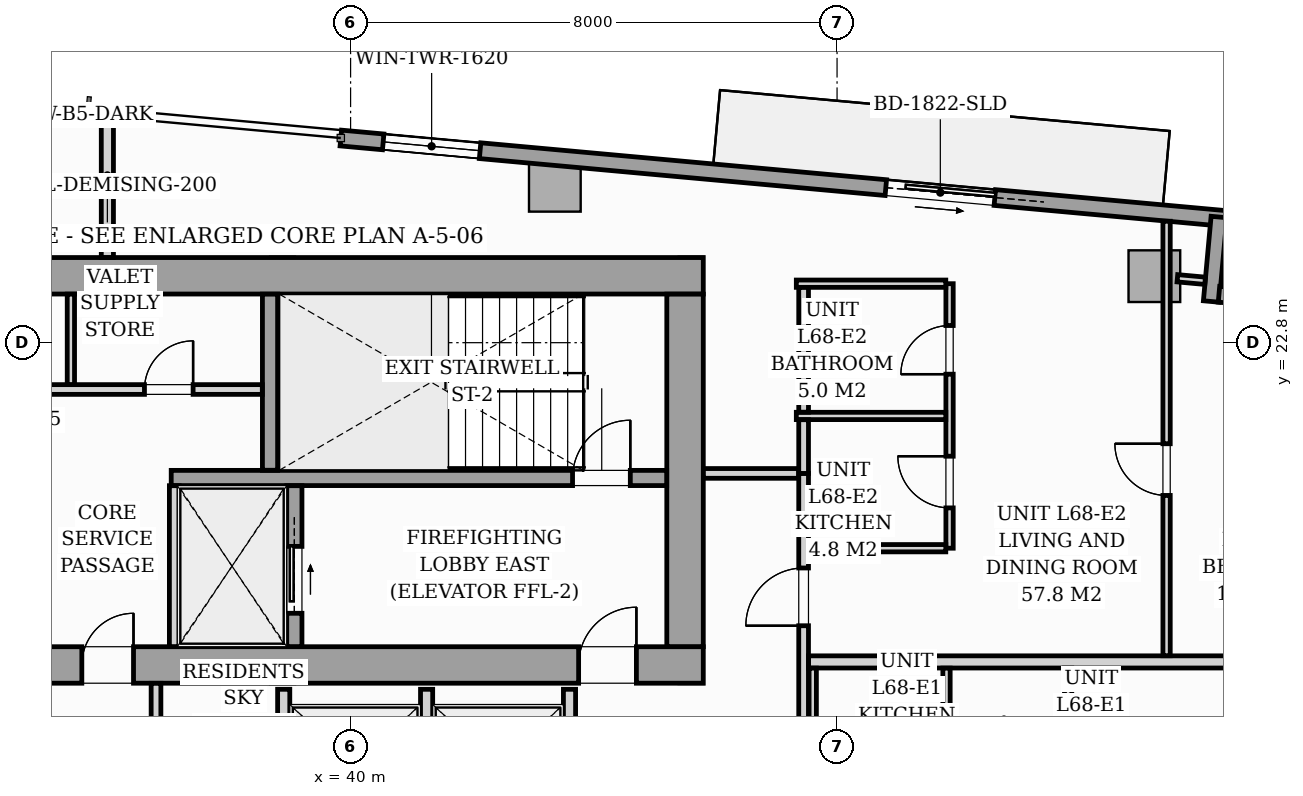
"""IFC4 building model, lengths in metres.
Left out: names, types, materials, properties, quantities, classifications, styles, units other than length and angle.
Written with IfcOpenShell. Run it as: python <this file> out.ifc"""

import sys

from ifc_helpers import new_model, si_unit, direction, frame, frame_2d, origin, origin_2d, place, context, subcontext, project, spatial, rectangle, i_section, extrude, source, transform, mapped, element, fill, save


model = new_model("IFC4")
c1 = context("Model", 3, precision=1e-05, world=origin(), true_north=direction((0.0, 1.0)))
c2 = subcontext(c1, "Body", "Model", "MODEL_VIEW")
j1 = project(units=[si_unit("LENGTHUNIT", "METRE"), si_unit("PLANEANGLEUNIT", "RADIAN")], contexts=[c1])
p1 = place(None, origin())
s1 = spatial("IfcSite", under=j1, at=p1, CompositionType="ELEMENT")
p2 = place(p1, origin())
s2 = spatial("IfcBuilding", under=s1, at=p2, CompositionType="ELEMENT")
p3 = place(p2, frame((0.0, 0.0, 236.4)))
s3 = spatial("IfcBuildingStorey", under=s2, at=p3, CompositionType="ELEMENT", Elevation=236.4)
m1 = source(origin(), c2, "Body", "SweptSolid", [
    extrude(i_section(OverallWidth=0.409, OverallDepth=0.425, WebThickness=0.033, FlangeThickness=0.052, FilletRadius=0.018, at=origin_2d()), origin(), (0.0, 0.0, 1.0), 3.296),
])
for number, where, z_axis, x_axis in (
    (1, (38.88, 17.4, 0.002), (0.0, 0.0, 1.0), (1.0, 0.0, 0.0)),
    (2, (45.6, 17.4, 0.002), (0.0, 0.0, 1.0), (1.0, 0.0, 0.0)),
    (3, (38.88, 24.0, 0.002), (0.0, 0.0, 1.0), (1.0, 0.0, 0.0)),
    (4, (45.6, 24.0, 0.002), (0.0, 0.0, 1.0), (1.0, 0.0, 0.0)),
):
    element("IfcColumn", number, at=place(p3, frame(where, z_axis=z_axis, x_axis=x_axis)), inside=s3, PredefinedType="PILASTER", context=c2, shape_type="MappedRepresentation", body=[
        mapped(m1, transform((0.0, 0.0, 0.0), scale=1.0)),
    ])
m2 = source(origin(), c2, "Body", "SweptSolid", [
    extrude(rectangle(XDim=0.85, YDim=0.85, at=origin_2d()), origin(), (0.0, 0.0, 1.0), 3.296),
])
for number, where, z_axis, x_axis in (
    (5, (43.359, 25.38, 0.002), (0.0, 0.0, 1.0), (0.996, -0.091, 0.0)),
    (6, (53.218, 23.894, 0.002), (0.0, 0.0, 1.0), (0.996, -0.091, 0.0)),
):
    element("IfcColumn", number, at=place(p3, frame(where, z_axis=z_axis, x_axis=x_axis)), inside=s3, PredefinedType="COLUMN", context=c2, shape_type="MappedRepresentation", body=[
        mapped(m2, transform((0.0, 0.0, 0.0), scale=1.0)),
    ])
p4 = place(p3, frame((39.839, 26.166, 0.0), z_axis=(0.0, 0.0, 1.0), x_axis=(0.995884447498, -0.090632043071, 0.0)))
e7 = element("IfcWall", 7, at=p4, inside=s3, PredefinedType="STANDARD", context=c2, shape_type="SweptSolid", body=[
    extrude(rectangle(XDim=14.63, YDim=0.26, at=frame_2d((7.315, 0.0))), origin(), (0.0, 0.0, 1.0), 3.04),
])
p5 = place(p4, frame((9.0, 0.0, 0.0)))
e8 = element("IfcOpeningElement", 8, at=p5, cuts=e7, PredefinedType="OPENING", context=c2, shape_type="SweptSolid", body=[
    extrude(rectangle(XDim=1.8, YDim=2.06, at=frame_2d((0.9, 1.03))), frame((0.0, 0.14, 0.0), z_axis=(0.0, -1.0, 0.0), x_axis=(1.0, 0.0, 0.0)), (0.0, 0.0, 1.0), 0.28),
])
p6 = place(p4, frame((0.7, 0.0, 0.65)))
e9 = element("IfcOpeningElement", 9, at=p6, cuts=e7, PredefinedType="OPENING", context=c2, shape_type="SweptSolid", body=[
    extrude(rectangle(XDim=1.6, YDim=1.5, at=frame_2d((0.8, 0.75))), frame((0.0, 0.14, 0.0), z_axis=(0.0, -1.0, 0.0), x_axis=(1.0, 0.0, 0.0)), (0.0, 0.0, 1.0), 0.28),
])
p7 = place(p3, frame((54.281, 24.866, 0.0), z_axis=(0.0, 0.0, 1.0), x_axis=(-0.090661991521, -0.995881721538, 0.0)))
e10 = element("IfcWall", 10, at=p7, inside=s3, PredefinedType="STANDARD", context=c2, shape_type="SweptSolid", body=[
    extrude(rectangle(XDim=1.395, YDim=0.26, at=frame_2d((0.698, 0.0))), origin(), (0.0, 0.0, 1.0), 3.04),
])
p8 = place(p3, frame((54.281, 23.596, 0.0), z_axis=(0.0, 0.0, 1.0), x_axis=(0.995883159782, -0.090646191665, 0.0)))
e11 = element("IfcWall", 11, at=p8, inside=s3, PredefinedType="STANDARD", context=c2, shape_type="SweptSolid", body=[
    extrude(rectangle(XDim=1.395, YDim=0.26, at=frame_2d((0.698, 0.0))), origin(), (0.0, 0.0, 1.0), 3.04),
])
p9 = place(p3, frame((26.2, 17.5, 0.0), z_axis=(0.0, 0.0, 1.0), x_axis=(1.0, 0.0, 0.0)))
e12 = element("IfcWall", 12, at=p9, inside=s3, PredefinedType="SHEAR", context=c2, shape_type="SweptSolid", body=[
    extrude(rectangle(XDim=19.6, YDim=0.6, at=frame_2d((9.8, 0.0))), origin(), (0.0, 0.0, 1.0), 3.3),
])
p10 = place(p9, frame((0.95, 0.0, 0.0)))
e13 = element("IfcOpeningElement", 13, at=p10, cuts=e12, PredefinedType="OPENING", context=c2, shape_type="SweptSolid", body=[
    extrude(rectangle(XDim=0.95, YDim=2.06, at=frame_2d((0.475, 1.03))), frame((0.0, 0.31, 0.0), z_axis=(0.0, -1.0, 0.0), x_axis=(1.0, 0.0, 0.0)), (0.0, 0.0, 1.0), 0.62),
])
p11 = place(p9, frame((9.38, 0.0, 0.0)))
e14 = element("IfcOpeningElement", 14, at=p11, cuts=e12, PredefinedType="OPENING", context=c2, shape_type="SweptSolid", body=[
    extrude(rectangle(XDim=0.85, YDim=2.0, at=frame_2d((0.425, 1.0))), frame((0.0, 0.31, 0.0), z_axis=(0.0, -1.0, 0.0), x_axis=(1.0, 0.0, 0.0)), (0.0, 0.0, 1.0), 0.62),
])
p12 = place(p9, frame((17.55, 0.0, 0.0)))
e15 = element("IfcOpeningElement", 15, at=p12, cuts=e12, PredefinedType="OPENING", context=c2, shape_type="SweptSolid", body=[
    extrude(rectangle(XDim=0.95, YDim=2.06, at=frame_2d((0.475, 1.03))), frame((0.0, 0.31, 0.0), z_axis=(0.0, -1.0, 0.0), x_axis=(1.0, 0.0, 0.0)), (0.0, 0.0, 1.0), 0.62),
])
p13 = place(p3, frame((26.2, 23.9, 0.0), z_axis=(0.0, 0.0, 1.0), x_axis=(1.0, 0.0, 0.0)))
e16 = element("IfcWall", 16, at=p13, inside=s3, PredefinedType="SHEAR", context=c2, shape_type="SweptSolid", body=[
    extrude(rectangle(XDim=19.6, YDim=0.6, at=frame_2d((9.8, 0.0))), origin(), (0.0, 0.0, 1.0), 3.3),
])
p14 = place(p3, frame((45.5, 17.802, 0.0), z_axis=(0.0, 0.0, 1.0), x_axis=(0.0, 1.0, 0.0)))
e17 = element("IfcWall", 17, at=p14, inside=s3, PredefinedType="SHEAR", context=c2, shape_type="SweptSolid", body=[
    extrude(rectangle(XDim=5.796, YDim=0.6, at=frame_2d((2.898, 0.0))), origin(), (0.0, 0.0, 1.0), 3.3),
])
p15 = place(p3, frame((37.05, 20.575, 0.0), z_axis=(0.0, 0.0, 1.0), x_axis=(1.0, 0.0, 0.0)))
e18 = element("IfcWall", 18, at=p15, inside=s3, PredefinedType="SOLIDWALL", context=c2, shape_type="SweptSolid", body=[
    extrude(rectangle(XDim=8.148, YDim=0.25, at=frame_2d((4.074, 0.0))), origin(), (0.0, 0.0, 1.0), 3.3),
])
p16 = place(p15, frame((6.6, 0.0, 0.0)))
e19 = element("IfcOpeningElement", 19, at=p16, cuts=e18, PredefinedType="OPENING", context=c2, shape_type="SweptSolid", body=[
    extrude(rectangle(XDim=0.95, YDim=2.06, at=frame_2d((0.475, 1.03))), frame((0.0, 0.135, 0.0), z_axis=(0.0, -1.0, 0.0), x_axis=(1.0, 0.0, 0.0)), (0.0, 0.0, 1.0), 0.27),
])
p17 = place(p3, frame((38.675, 20.702, 0.0), z_axis=(0.0, 0.0, 1.0), x_axis=(0.0, 1.0, 0.0)))
e20 = element("IfcWall", 20, at=p17, inside=s3, PredefinedType="SOLIDWALL", context=c2, shape_type="SweptSolid", body=[
    extrude(rectangle(XDim=2.896, YDim=0.25, at=frame_2d((1.448, 0.0))), origin(), (0.0, 0.0, 1.0), 3.3),
])
p18 = place(p3, frame((37.1, 17.802, 0.0), z_axis=(0.0, 0.0, 1.0), x_axis=(0.0, 1.0, 0.0)))
e21 = element("IfcWall", 21, at=p18, inside=s3, PredefinedType="PARTITIONING", context=c2, shape_type="SweptSolid", body=[
    extrude(rectangle(XDim=2.646, YDim=0.16, at=frame_2d((1.323, 0.0))), origin(), (0.0, 0.0, 1.0), 3.04),
])
p19 = place(p3, frame((39.075, 17.802, 0.0), z_axis=(0.0, 0.0, 1.0), x_axis=(0.0, 1.0, 0.0)))
e22 = element("IfcWall", 22, at=p19, inside=s3, PredefinedType="SOLIDWALL", context=c2, shape_type="SweptSolid", body=[
    extrude(rectangle(XDim=2.646, YDim=0.25, at=frame_2d((1.323, 0.0))), origin(), (0.0, 0.0, 1.0), 3.3),
])
p20 = place(p19, frame((0.548, 0.0, 0.0)))
e23 = element("IfcOpeningElement", 23, at=p20, cuts=e22, PredefinedType="OPENING", context=c2, shape_type="SweptSolid", body=[
    extrude(rectangle(XDim=1.1, YDim=2.08, at=frame_2d((0.55, 1.04))), frame((0.0, 0.135, 0.0), z_axis=(0.0, -1.0, 0.0), x_axis=(1.0, 0.0, 0.0)), (0.0, 0.0, 1.0), 0.27),
])
p21 = place(p3, frame((33.452, 22.03, 0.0), z_axis=(0.0, 0.0, 1.0), x_axis=(1.0, 0.0, 0.0)))
e24 = element("IfcWall", 24, at=p21, inside=s3, PredefinedType="PARTITIONING", context=c2, shape_type="SweptSolid", body=[
    extrude(rectangle(XDim=5.096, YDim=0.16, at=frame_2d((2.548, 0.0))), origin(), (0.0, 0.0, 1.0), 3.04),
])
p22 = place(p21, frame((0.538, 0.0, 0.0)))
e25 = element("IfcOpeningElement", 25, at=p22, cuts=e24, PredefinedType="OPENING", context=c2, shape_type="SweptSolid", body=[
    extrude(rectangle(XDim=0.8, YDim=2.05, at=frame_2d((0.4, 1.025))), frame((0.0, 0.09, 0.0), z_axis=(0.0, -1.0, 0.0), x_axis=(1.0, 0.0, 0.0)), (0.0, 0.0, 1.0), 0.18),
])
p23 = place(p21, frame((3.158, 0.0, 0.0)))
e26 = element("IfcOpeningElement", 26, at=p23, cuts=e24, PredefinedType="OPENING", context=c2, shape_type="SweptSolid", body=[
    extrude(rectangle(XDim=0.8, YDim=2.05, at=frame_2d((0.4, 1.025))), frame((0.0, 0.09, 0.0), z_axis=(0.0, -1.0, 0.0), x_axis=(1.0, 0.0, 0.0)), (0.0, 0.0, 1.0), 0.18),
])
p24 = place(p3, frame((35.4, 22.112, 0.0), z_axis=(0.0, 0.0, 1.0), x_axis=(0.0, 1.0, 0.0)))
e27 = element("IfcWall", 27, at=p24, inside=s3, PredefinedType="PARTITIONING", context=c2, shape_type="SweptSolid", body=[
    extrude(rectangle(XDim=1.486, YDim=0.12, at=frame_2d((0.743, 0.0))), origin(), (0.0, 0.0, 1.0), 3.04),
])
for number, where, z_axis, x_axis in (
    (28, (38.9, 14.75, 0.0), (0.0, 0.0, 1.0), (0.0, 1.0, 0.0)),
    (29, (41.25, 14.75, 0.0), (0.0, 0.0, 1.0), (0.0, 1.0, 0.0)),
    (30, (43.6, 14.75, 0.0), (0.0, 0.0, 1.0), (0.0, 1.0, 0.0)),
):
    element("IfcWall", number, at=place(p3, frame(where, z_axis=z_axis, x_axis=x_axis)), inside=s3, PredefinedType="PARTITIONING", context=c2, shape_type="SweptSolid", body=[
        extrude(rectangle(XDim=2.35, YDim=0.2, at=frame_2d((1.175, 0.0))), origin(), (0.0, 0.0, 1.0), 3.04),
    ])
p25 = place(p3, frame((47.45, 13.362, 0.0), z_axis=(0.0, 0.0, 1.0), x_axis=(0.0, 1.0, 0.0)))
e31 = element("IfcWall", 31, at=p25, inside=s3, PredefinedType="PARTITIONING", context=c2, shape_type="SweptSolid", body=[
    extrude(rectangle(XDim=7.288, YDim=0.16, at=frame_2d((3.644, 0.0))), origin(), (0.0, 0.0, 1.0), 3.04),
])
p26 = place(p25, frame((0.493, 0.0, 0.0)))
e32 = element("IfcOpeningElement", 32, at=p26, cuts=e31, PredefinedType="OPENING", context=c2, shape_type="SweptSolid", body=[
    extrude(rectangle(XDim=0.95, YDim=2.06, at=frame_2d((0.475, 1.03))), frame((0.0, 0.09, 0.0), z_axis=(0.0, -1.0, 0.0), x_axis=(1.0, 0.0, 0.0)), (0.0, 0.0, 1.0), 0.18),
])
p27 = place(p25, frame((4.783, 0.0, 0.0)))
e33 = element("IfcOpeningElement", 33, at=p27, cuts=e31, PredefinedType="OPENING", context=c2, shape_type="SweptSolid", body=[
    extrude(rectangle(XDim=0.95, YDim=2.06, at=frame_2d((0.475, 1.03))), frame((0.0, 0.09, 0.0), z_axis=(0.0, -1.0, 0.0), x_axis=(1.0, 0.0, 0.0)), (0.0, 0.0, 1.0), 0.18),
])
p28 = place(p3, frame((36.0, 24.202, 0.0), z_axis=(0.0, 0.0, 1.0), x_axis=(0.0, 1.0, 0.0)))
e34 = element("IfcWall", 34, at=p28, inside=s3, PredefinedType="PARTITIONING", context=c2, shape_type="SweptSolid", body=[
    extrude(rectangle(XDim=2.363, YDim=0.2, at=frame_2d((1.182, 0.0))), origin(), (0.0, 0.0, 1.0), 3.04),
])
p29 = place(p3, frame((45.802, 20.65, 0.0), z_axis=(0.0, 0.0, 1.0), x_axis=(1.0, 0.0, 0.0)))
e35 = element("IfcWall", 35, at=p29, inside=s3, PredefinedType="PARTITIONING", context=c2, shape_type="SweptSolid", body=[
    extrude(rectangle(XDim=1.566, YDim=0.16, at=frame_2d((0.783, 0.0))), origin(), (0.0, 0.0, 1.0), 3.04),
])
p30 = place(p3, frame((47.532, 17.55, 0.0), z_axis=(0.0, 0.0, 1.0), x_axis=(1.0, 0.0, 0.0)))
e36 = element("IfcWall", 36, at=p30, inside=s3, PredefinedType="PARTITIONING", context=c2, shape_type="SweptSolid", body=[
    extrude(rectangle(XDim=8.643, YDim=0.2, at=frame_2d((4.322, 0.0))), origin(), (0.0, 0.0, 1.0), 3.04),
])
for number, where, z_axis, x_axis in (
    (37, (47.6, 15.262, 0.0), (0.0, 0.0, 1.0), (0.0, 1.0, 0.0)),
    (38, (49.8, 15.262, 0.0), (0.0, 0.0, 1.0), (0.0, 1.0, 0.0)),
    (39, (51.8, 15.262, 0.0), (0.0, 0.0, 1.0), (0.0, 1.0, 0.0)),
):
    element("IfcWall", number, at=place(p3, frame(where, z_axis=z_axis, x_axis=x_axis)), inside=s3, PredefinedType="PARTITIONING", context=c2, shape_type="SweptSolid", body=[
        extrude(rectangle(XDim=2.186, YDim=0.12, at=frame_2d((1.093, 0.0))), origin(), (0.0, 0.0, 1.0), 3.04),
    ])
p31 = place(p3, frame((49.85, 19.42, 0.0), z_axis=(0.0, 0.0, 1.0), x_axis=(0.0, 1.0, 0.0)))
e40 = element("IfcWall", 40, at=p31, inside=s3, PredefinedType="PARTITIONING", context=c2, shape_type="SweptSolid", body=[
    extrude(rectangle(XDim=4.35, YDim=0.12, at=frame_2d((2.175, 0.0))), origin(), (0.0, 0.0, 1.0), 3.04),
])
p32 = place(p31, frame((0.663, 0.0, 0.0)))
e41 = element("IfcOpeningElement", 41, at=p32, cuts=e40, PredefinedType="OPENING", context=c2, shape_type="SweptSolid", body=[
    extrude(rectangle(XDim=0.85, YDim=2.05, at=frame_2d((0.425, 1.025))), frame((0.0, 0.07, 0.0), z_axis=(0.0, -1.0, 0.0), x_axis=(1.0, 0.0, 0.0)), (0.0, 0.0, 1.0), 0.14),
])
p33 = place(p31, frame((2.862, 0.0, 0.0)))
e42 = element("IfcOpeningElement", 42, at=p33, cuts=e40, PredefinedType="OPENING", context=c2, shape_type="SweptSolid", body=[
    extrude(rectangle(XDim=0.8, YDim=2.02, at=frame_2d((0.4, 1.01))), frame((0.0, 0.07, 0.0), z_axis=(0.0, -1.0, 0.0), x_axis=(1.0, 0.0, 0.0)), (0.0, 0.0, 1.0), 0.14),
])
p34 = place(p3, frame((47.33, 21.595, 0.0), z_axis=(0.0, 0.0, 1.0), x_axis=(1.0, 0.0, 0.0)))
e43 = element("IfcWall", 43, at=p34, inside=s3, PredefinedType="PARTITIONING", context=c2, shape_type="SweptSolid", body=[
    extrude(rectangle(XDim=2.458, YDim=0.12, at=frame_2d((1.229, 0.0))), origin(), (0.0, 0.0, 1.0), 3.04),
])
p35 = place(p3, frame((47.532, 19.42, 0.0), z_axis=(0.0, 0.0, 1.0), x_axis=(1.0, 0.0, 0.0)))
e44 = element("IfcWall", 44, at=p35, inside=s3, PredefinedType="PARTITIONING", context=c2, shape_type="SweptSolid", body=[
    extrude(rectangle(XDim=2.256, YDim=0.12, at=frame_2d((1.128, 0.0))), origin(), (0.0, 0.0, 1.0), 3.04),
])
p36 = place(p3, frame((47.33, 23.77, 0.0), z_axis=(0.0, 0.0, 1.0), x_axis=(1.0, 0.0, 0.0)))
e45 = element("IfcWall", 45, at=p36, inside=s3, PredefinedType="PARTITIONING", context=c2, shape_type="SweptSolid", body=[
    extrude(rectangle(XDim=2.458, YDim=0.12, at=frame_2d((1.229, 0.0))), origin(), (0.0, 0.0, 1.0), 3.04),
])
p37 = place(p3, frame((47.45, 20.65, 0.0), z_axis=(0.0, 0.0, 1.0), x_axis=(0.0, 1.0, 0.0)))
e46 = element("IfcWall", 46, at=p37, inside=s3, PredefinedType="PARTITIONING", context=c2, shape_type="SweptSolid", body=[
    extrude(rectangle(XDim=0.883, YDim=0.16, at=frame_2d((0.441, 0.0))), origin(), (0.0, 0.0, 1.0), 3.04),
])
p38 = place(p3, frame((47.45, 21.657, 0.0), z_axis=(0.0, 0.0, 1.0), x_axis=(0.0, 1.0, 0.0)))
e47 = element("IfcWall", 47, at=p38, inside=s3, PredefinedType="PARTITIONING", context=c2, shape_type="SweptSolid", body=[
    extrude(rectangle(XDim=2.051, YDim=0.16, at=frame_2d((1.025, 0.0))), origin(), (0.0, 0.0, 1.0), 3.04),
])
p39 = place(p3, frame((53.419, 17.652, 0.0), z_axis=(0.0, 0.0, 1.0), x_axis=(0.0, 1.0, 0.0)))
e48 = element("IfcWall", 48, at=p39, inside=s3, PredefinedType="PARTITIONING", context=c2, shape_type="SweptSolid", body=[
    extrude(rectangle(XDim=7.145, YDim=0.12, at=frame_2d((3.573, 0.0))), origin(), (0.0, 0.0, 1.0), 2.483),
])
p40 = place(p39, frame((2.636, 0.0, 0.0)))
e49 = element("IfcOpeningElement", 49, at=p40, cuts=e48, PredefinedType="OPENING", context=c2, shape_type="SweptSolid", body=[
    extrude(rectangle(XDim=0.85, YDim=2.05, at=frame_2d((0.425, 1.025))), frame((0.0, 0.07, 0.0), z_axis=(0.0, -1.0, 0.0), x_axis=(1.0, 0.0, 0.0)), (0.0, 0.0, 1.0), 0.14),
])
p41 = place(p3, frame((36.8, 14.7, 0.0), z_axis=(0.0, 0.0, 1.0), x_axis=(0.0, 1.0, 0.0)))
e50 = element("IfcWall", 50, at=p41, inside=s3, PredefinedType="PARTITIONING", context=c2, shape_type="SweptSolid", body=[
    extrude(rectangle(XDim=2.498, YDim=0.16, at=frame_2d((1.249, 0.0))), origin(), (0.0, 0.0, 1.0), 3.04),
])
p42 = place(p3, frame((53.597, 23.859, 0.0), z_axis=(0.0, 0.0, 1.0), x_axis=(0.995884462012, -0.090631883588, 0.0)))
e51 = element("IfcWall", 51, at=p42, inside=s3, PredefinedType="PARTITIONING", context=c2, shape_type="SweptSolid", body=[
    extrude(rectangle(XDim=0.458, YDim=0.12, at=frame_2d((0.229, 0.0))), origin(), (0.0, 0.0, 1.0), 3.04),
])
m3 = source(origin(), c2, "Body", "SweptSolid", [
    extrude(rectangle(XDim=1.8, YDim=2.06, at=frame_2d((0.9, 1.03))), frame((0.0, 0.025, 0.0), z_axis=(0.0, -1.0, 0.0), x_axis=(1.0, 0.0, 0.0)), (0.0, 0.0, 1.0), 0.05),
])
p43 = place(p5, origin())
e52 = element("IfcDoor", 52, at=p43, inside=s3, OperationType="SLIDING_TO_RIGHT", PredefinedType="DOOR", context=c2, shape_type="MappedRepresentation", body=[
    mapped(m3, transform((0.0, 0.0, 0.0), scale=1.0)),
])
fill(e8, e52)
m4 = source(origin(), c2, "Body", "SweptSolid", [
    extrude(rectangle(XDim=1.6, YDim=1.5, at=frame_2d((0.8, 0.75))), frame((0.0, 0.03, 0.0), z_axis=(0.0, -1.0, 0.0), x_axis=(1.0, 0.0, 0.0)), (0.0, 0.0, 1.0), 0.06),
])
p44 = place(p6, origin())
e53 = element("IfcWindow", 53, at=p44, inside=s3, PartitioningType="SINGLE_PANEL", PredefinedType="WINDOW", context=c2, shape_type="MappedRepresentation", body=[
    mapped(m4, transform((0.0, 0.0, 0.0), scale=1.0)),
])
fill(e9, e53)
m5 = source(origin(), c2, "Body", "SweptSolid", [
    extrude(rectangle(XDim=0.85, YDim=2.0, at=frame_2d((0.425, 1.0))), frame((0.0, 0.025, 0.0), z_axis=(0.0, -1.0, 0.0), x_axis=(1.0, 0.0, 0.0)), (0.0, 0.0, 1.0), 0.05),
])
p45 = place(p11, origin())
e54 = element("IfcDoor", 54, at=p45, inside=s3, OperationType="SINGLE_SWING_RIGHT", PredefinedType="DOOR", context=c2, shape_type="MappedRepresentation", body=[
    mapped(m5, transform((0.0, 0.0, 0.0), scale=1.0)),
])
fill(e14, e54)
m6 = source(origin(), c2, "Body", "SweptSolid", [
    extrude(rectangle(XDim=0.95, YDim=2.06, at=frame_2d((0.475, 1.03))), frame((0.0, 0.025, 0.0), z_axis=(0.0, -1.0, 0.0), x_axis=(1.0, 0.0, 0.0)), (0.0, 0.0, 1.0), 0.05),
])
p46 = place(p12, origin())
e55 = element("IfcDoor", 55, at=p46, inside=s3, OperationType="SINGLE_SWING_RIGHT", PredefinedType="DOOR", context=c2, shape_type="MappedRepresentation", body=[
    mapped(m6, transform((0.0, 0.0, 0.0), scale=1.0)),
])
fill(e15, e55)
p47 = place(p16, origin())
e56 = element("IfcDoor", 56, at=p47, inside=s3, OperationType="SINGLE_SWING_RIGHT", PredefinedType="DOOR", context=c2, shape_type="MappedRepresentation", body=[
    mapped(m6, transform((0.0, 0.0, 0.0), scale=1.0)),
])
fill(e19, e56)
m7 = source(origin(), c2, "Body", "SweptSolid", [
    extrude(rectangle(XDim=1.1, YDim=2.08, at=frame_2d((0.55, 1.04))), frame((0.0, 0.025, 0.0), z_axis=(0.0, -1.0, 0.0), x_axis=(1.0, 0.0, 0.0)), (0.0, 0.0, 1.0), 0.05),
])
p48 = place(p20, origin())
e57 = element("IfcDoor", 57, at=p48, inside=s3, OperationType="SLIDING_TO_RIGHT", PredefinedType="DOOR", context=c2, shape_type="MappedRepresentation", body=[
    mapped(m7, transform((0.0, 0.0, 0.0), scale=1.0)),
])
fill(e23, e57)
m8 = source(origin(), c2, "Body", "SweptSolid", [
    extrude(rectangle(XDim=0.8, YDim=2.05, at=frame_2d((0.4, 1.025))), frame((0.0, 0.025, 0.0), z_axis=(0.0, -1.0, 0.0), x_axis=(1.0, 0.0, 0.0)), (0.0, 0.0, 1.0), 0.05),
])
p49 = place(p23, origin())
e58 = element("IfcDoor", 58, at=p49, inside=s3, OperationType="SINGLE_SWING_RIGHT", PredefinedType="DOOR", context=c2, shape_type="MappedRepresentation", body=[
    mapped(m8, transform((0.0, 0.0, 0.0), scale=1.0)),
])
fill(e26, e58)
m9 = source(origin(), c2, "Body", "SweptSolid", [
    extrude(rectangle(XDim=0.95, YDim=2.06, at=frame_2d((0.475, 1.03))), frame((0.0, 0.025, 0.0), z_axis=(0.0, -1.0, 0.0), x_axis=(1.0, 0.0, 0.0)), (0.0, 0.0, 1.0), 0.05),
])
p50 = place(p27, origin())
e59 = element("IfcDoor", 59, at=p50, inside=s3, OperationType="SINGLE_SWING_LEFT", PredefinedType="DOOR", context=c2, shape_type="MappedRepresentation", body=[
    mapped(m9, transform((0.0, 0.0, 0.0), scale=1.0)),
])
fill(e33, e59)
m10 = source(origin(), c2, "Body", "SweptSolid", [
    extrude(rectangle(XDim=0.85, YDim=2.05, at=frame_2d((0.425, 1.025))), frame((0.0, 0.025, 0.0), z_axis=(0.0, -1.0, 0.0), x_axis=(1.0, 0.0, 0.0)), (0.0, 0.0, 1.0), 0.05),
])
p51 = place(p32, origin())
e60 = element("IfcDoor", 60, at=p51, inside=s3, OperationType="SINGLE_SWING_RIGHT", PredefinedType="DOOR", context=c2, shape_type="MappedRepresentation", body=[
    mapped(m10, transform((0.0, 0.0, 0.0), scale=1.0)),
])
fill(e41, e60)
m11 = source(origin(), c2, "Body", "SweptSolid", [
    extrude(rectangle(XDim=0.8, YDim=2.02, at=frame_2d((0.4, 1.01))), frame((0.0, 0.025, 0.0), z_axis=(0.0, -1.0, 0.0), x_axis=(1.0, 0.0, 0.0)), (0.0, 0.0, 1.0), 0.05),
])
p52 = place(p33, origin())
e61 = element("IfcDoor", 61, at=p52, inside=s3, OperationType="SINGLE_SWING_LEFT", PredefinedType="DOOR", context=c2, shape_type="MappedRepresentation", body=[
    mapped(m11, transform((0.0, 0.0, 0.0), scale=1.0)),
])
fill(e42, e61)
p53 = place(p40, origin())
e62 = element("IfcDoor", 62, at=p53, inside=s3, OperationType="SINGLE_SWING_RIGHT", PredefinedType="DOOR", context=c2, shape_type="MappedRepresentation", body=[
    mapped(m10, transform((0.0, 0.0, 0.0), scale=1.0)),
])
fill(e49, e62)
save(model, sys.argv[1])
